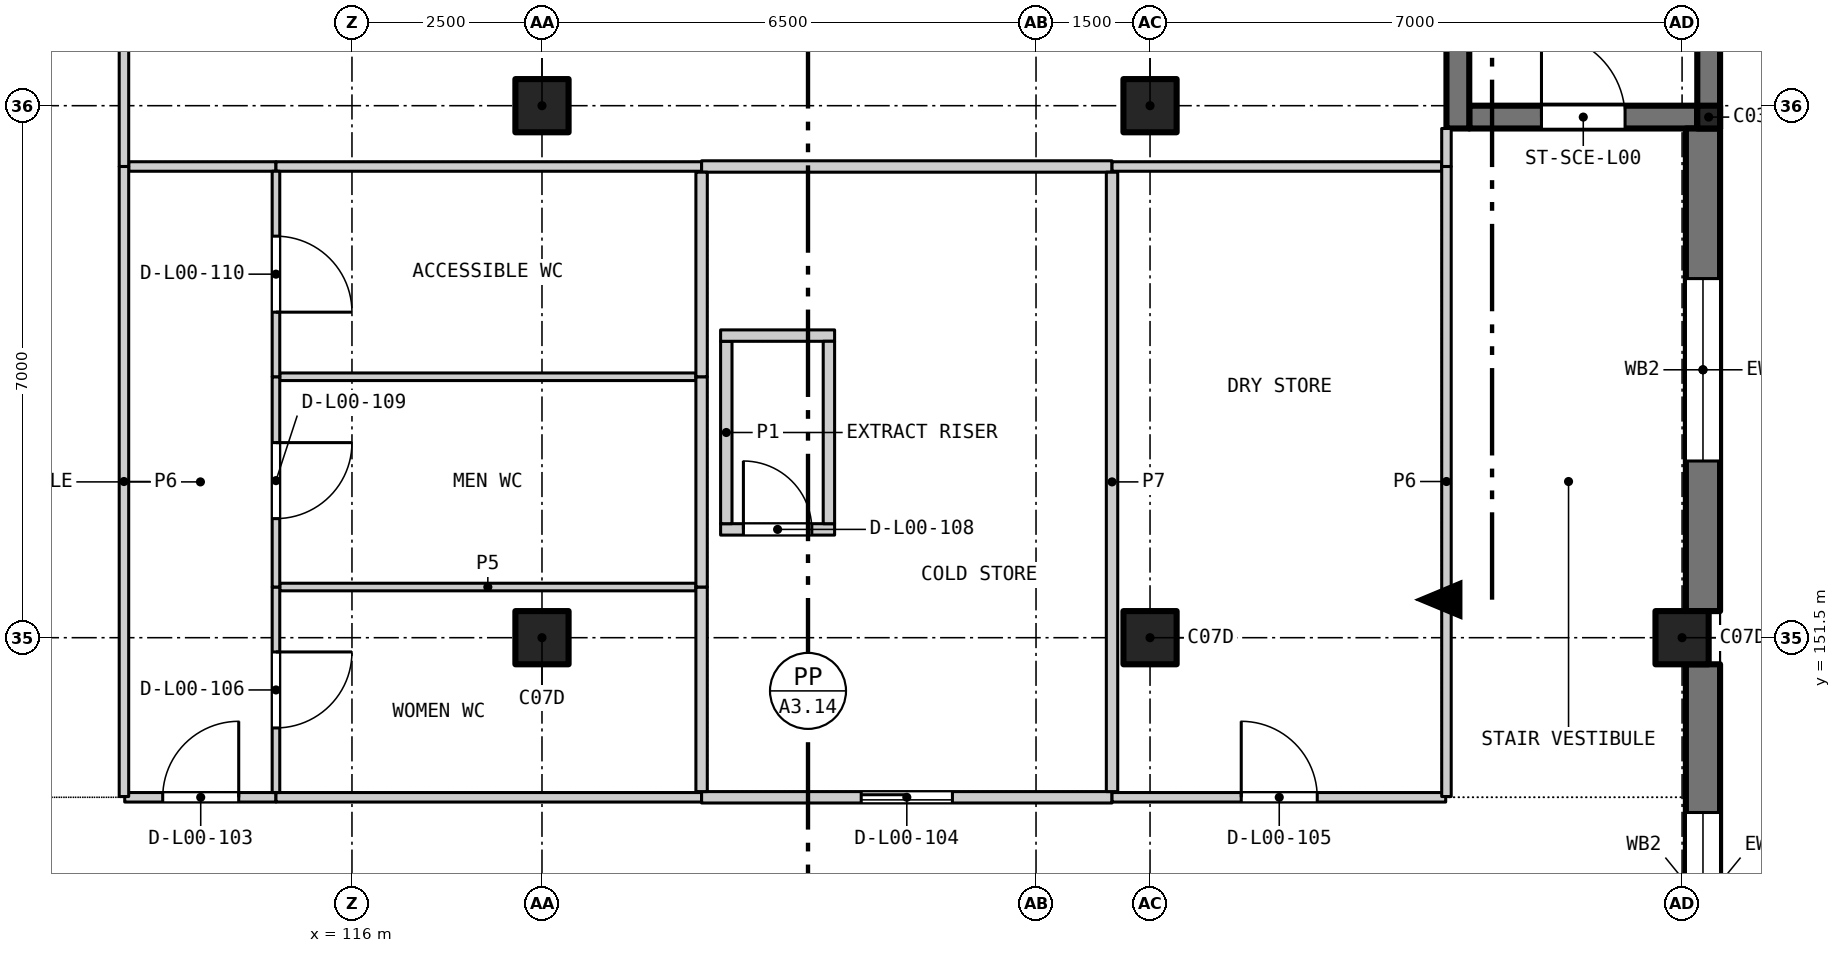
"""IFC4 building model, lengths in metres.
Left out: names, types, materials, properties, quantities, classifications, styles, units other than length and angle.
Written with IfcOpenShell. Run it as: python <this file> out.ifc"""

import sys

from ifc_helpers import new_model, si_unit, direction, frame, frame_2d, origin, origin_2d, place, context, subcontext, project, spatial, rectangle, extrude, element, fill, save


model = new_model("IFC4")
c1 = context("Model", 3, precision=1e-05, world=origin(), true_north=direction((0.0, 1.0)))
c2 = subcontext(c1, "Body", "Model", "MODEL_VIEW")
j1 = project(units=[si_unit("LENGTHUNIT", "METRE"), si_unit("PLANEANGLEUNIT", "RADIAN")], contexts=[c1])
p1 = place(None, origin())
s1 = spatial("IfcSite", under=j1, at=p1, CompositionType="ELEMENT")
p2 = place(p1, origin())
s2 = spatial("IfcBuilding", under=s1, at=p2, CompositionType="ELEMENT")
p3 = place(p2, origin())
s3 = spatial("IfcBuildingStorey", under=s2, at=p3, CompositionType="ELEMENT", Elevation=0.0)
for number, where, z_axis, x_axis in (
    (1, (118.5, 151.5, -1.4), (0.0, 0.0, 1.0), (1.0, 0.0, 0.0)),
    (2, (118.5, 158.5, -1.4), (0.0, 0.0, 1.0), (1.0, 0.0, 0.0)),
    (3, (126.5, 151.5, -1.4), (0.0, 0.0, 1.0), (1.0, 0.0, 0.0)),
    (4, (126.5, 158.5, -1.4), (0.0, 0.0, 1.0), (1.0, 0.0, 0.0)),
    (5, (133.5, 151.5, -1.4), (0.0, 0.0, 1.0), (1.0, 0.0, 0.0)),
):
    element("IfcColumn", number, at=place(p3, frame(where, z_axis=z_axis, x_axis=x_axis)), inside=s3, PredefinedType="COLUMN", context=c2, shape_type="SweptSolid", body=[
        extrude(rectangle(XDim=0.7, YDim=0.7, at=origin_2d()), origin(), (0.0, 0.0, 1.0), 7.4),
    ])
p4 = place(p3, frame((133.85, 158.35, -1.4), z_axis=(0.0, 0.0, 1.0), x_axis=(1.0, 0.0, 0.0)))
e6 = element("IfcColumn", 6, at=p4, inside=s3, PredefinedType="COLUMN", context=c2, shape_type="SweptSolid", body=[
    extrude(rectangle(XDim=0.3, YDim=0.3, at=origin_2d()), origin(), (0.0, 0.0, 1.0), 1.1),
])
p5 = place(p3, frame((130.7, 158.35, -1.4), z_axis=(0.0, 0.0, 1.0), x_axis=(1.0, 0.0, 0.0)))
e7 = element("IfcWall", 7, at=p5, inside=s3, PredefinedType="SHEAR", context=c2, shape_type="SweptSolid", body=[
    extrude(rectangle(XDim=3.0, YDim=0.3, at=frame_2d((1.5, 0.0))), origin(), (0.0, 0.0, 1.0), 7.4),
])
p6 = place(p5, frame((0.95, 0.0, 1.4)))
e8 = element("IfcOpeningElement", 8, at=p6, cuts=e7, PredefinedType="OPENING", context=c2, shape_type="SweptSolid", body=[
    extrude(rectangle(XDim=1.1, YDim=2.1, at=frame_2d((0.55, 1.05))), frame((0.0, 0.16, 0.0), z_axis=(0.0, -1.0, 0.0), x_axis=(1.0, 0.0, 0.0)), (0.0, 0.0, 1.0), 0.32),
])
p7 = place(p3, frame((130.55, 158.2, -1.4), z_axis=(0.0, 0.0, 1.0), x_axis=(0.0, 1.0, 0.0)))
e9 = element("IfcWall", 9, at=p7, inside=s3, PredefinedType="SHEAR", context=c2, shape_type="SweptSolid", body=[
    extrude(rectangle(XDim=7.5, YDim=0.3, at=frame_2d((3.75, 0.0))), origin(), (0.0, 0.0, 1.0), 7.4),
])
p8 = place(p3, frame((133.85, 165.7, 0.0), z_axis=(0.0, 0.0, 1.0), x_axis=(0.0, -1.0, 0.0)))
e10 = element("IfcWall", 10, at=p8, inside=s3, PredefinedType="SOLIDWALL", context=c2, shape_type="SweptSolid", body=[
    extrude(rectangle(XDim=7.5, YDim=0.3, at=frame_2d((3.75, 0.0))), origin(), (0.0, 0.0, 1.0), 5.7),
])
p9 = place(p3, frame((133.775, 151.15, 0.0), z_axis=(0.0, 0.0, 1.0), x_axis=(0.0, -1.0, 0.0)))
e11 = element("IfcWall", 11, at=p9, inside=s3, PredefinedType="SOLIDWALL", context=c2, shape_type="SweptSolid", body=[
    extrude(rectangle(XDim=6.3, YDim=0.45, at=frame_2d((3.15, 0.0))), origin(), (0.0, 0.0, 1.0), 5.0),
])
p10 = place(p9, frame((1.95, 0.0, 0.9)))
e12 = element("IfcOpeningElement", 12, at=p10, cuts=e11, PredefinedType="OPENING", context=c2, shape_type="SweptSolid", body=[
    extrude(rectangle(XDim=2.4, YDim=1.6, at=frame_2d((1.2, 0.8))), frame((0.0, 0.235, 0.0), z_axis=(0.0, -1.0, 0.0), x_axis=(1.0, 0.0, 0.0)), (0.0, 0.0, 1.0), 0.47),
])
p11 = place(p3, frame((133.775, 158.2, 0.0), z_axis=(0.0, 0.0, 1.0), x_axis=(0.0, -1.0, 0.0)))
e13 = element("IfcWall", 13, at=p11, inside=s3, PredefinedType="SOLIDWALL", context=c2, shape_type="SweptSolid", body=[
    extrude(rectangle(XDim=6.35, YDim=0.45, at=frame_2d((3.175, 0.0))), origin(), (0.0, 0.0, 1.0), 5.0),
])
p12 = place(p11, frame((1.975, 0.0, 0.9)))
e14 = element("IfcOpeningElement", 14, at=p12, cuts=e13, PredefinedType="OPENING", context=c2, shape_type="SweptSolid", body=[
    extrude(rectangle(XDim=2.4, YDim=1.6, at=frame_2d((1.2, 0.8))), frame((0.0, 0.235, 0.0), z_axis=(0.0, -1.0, 0.0), x_axis=(1.0, 0.0, 0.0)), (0.0, 0.0, 1.0), 0.47),
])
p13 = place(p3, frame((120.85, 152.925, 0.0), z_axis=(0.0, 0.0, 1.0), x_axis=(1.0, 0.0, 0.0)))
e15 = element("IfcWall", 15, at=p13, inside=s3, PredefinedType="PARTITIONING", context=c2, shape_type="SweptSolid", body=[
    extrude(rectangle(XDim=1.5, YDim=0.15, at=frame_2d((0.75, 0.0))), origin(), (0.0, 0.0, 1.0), 5.7),
])
p14 = place(p13, frame((0.3, 0.0, 0.0)))
e16 = element("IfcOpeningElement", 16, at=p14, cuts=e15, PredefinedType="OPENING", context=c2, shape_type="SweptSolid", body=[
    extrude(rectangle(XDim=0.9, YDim=2.1, at=frame_2d((0.45, 1.05))), frame((0.0, 0.085, 0.0), z_axis=(0.0, -1.0, 0.0), x_axis=(1.0, 0.0, 0.0)), (0.0, 0.0, 1.0), 0.17),
])
p15 = place(p3, frame((120.925, 153.0, 0.0), z_axis=(0.0, 0.0, 1.0), x_axis=(0.0, 1.0, 0.0)))
e17 = element("IfcWall", 17, at=p15, inside=s3, PredefinedType="PARTITIONING", context=c2, shape_type="SweptSolid", body=[
    extrude(rectangle(XDim=2.4, YDim=0.15, at=frame_2d((1.2, 0.0))), origin(), (0.0, 0.0, 1.0), 5.7),
])
p16 = place(p3, frame((120.85, 155.475, 0.0), z_axis=(0.0, 0.0, 1.0), x_axis=(1.0, 0.0, 0.0)))
e18 = element("IfcWall", 18, at=p16, inside=s3, PredefinedType="PARTITIONING", context=c2, shape_type="SweptSolid", body=[
    extrude(rectangle(XDim=1.5, YDim=0.15, at=frame_2d((0.75, 0.0))), origin(), (0.0, 0.0, 1.0), 5.7),
])
p17 = place(p3, frame((122.275, 153.0, 0.0), z_axis=(0.0, 0.0, 1.0), x_axis=(0.0, 1.0, 0.0)))
e19 = element("IfcWall", 19, at=p17, inside=s3, PredefinedType="PARTITIONING", context=c2, shape_type="SweptSolid", body=[
    extrude(rectangle(XDim=2.4, YDim=0.15, at=frame_2d((1.2, 0.0))), origin(), (0.0, 0.0, 1.0), 5.7),
])
p18 = place(p3, frame((113.01, 149.4, 0.0), z_axis=(0.0, 0.0, 1.0), x_axis=(1.0, 0.0, 0.0)))
e20 = element("IfcWall", 20, at=p18, inside=s3, PredefinedType="PARTITIONING", context=c2, shape_type="SweptSolid", body=[
    extrude(rectangle(XDim=1.99, YDim=0.125, at=frame_2d((0.995, 0.0))), origin(), (0.0, 0.0, 1.0), 5.7),
])
p19 = place(p18, frame((0.5, 0.0, 0.0)))
e21 = element("IfcOpeningElement", 21, at=p19, cuts=e20, PredefinedType="OPENING", context=c2, shape_type="SweptSolid", body=[
    extrude(rectangle(XDim=1.0, YDim=2.1, at=frame_2d((0.5, 1.05))), frame((0.0, 0.073, 0.0), z_axis=(0.0, -1.0, 0.0), x_axis=(1.0, 0.0, 0.0)), (0.0, 0.0, 1.0), 0.145),
])
p20 = place(p3, frame((115.0, 149.4, 0.0), z_axis=(0.0, 0.0, 1.0), x_axis=(1.0, 0.0, 0.0)))
e22 = element("IfcWall", 22, at=p20, inside=s3, PredefinedType="PARTITIONING", context=c2, shape_type="SweptSolid", body=[
    extrude(rectangle(XDim=5.6, YDim=0.125, at=frame_2d((2.8, 0.0))), origin(), (0.0, 0.0, 1.0), 5.7),
])
p21 = place(p3, frame((120.6, 149.4, 0.0), z_axis=(0.0, 0.0, 1.0), x_axis=(1.0, 0.0, 0.0)))
e23 = element("IfcWall", 23, at=p21, inside=s3, PredefinedType="PARTITIONING", context=c2, shape_type="SweptSolid", body=[
    extrude(rectangle(XDim=5.4, YDim=0.15, at=frame_2d((2.7, 0.0))), origin(), (0.0, 0.0, 1.0), 5.7),
])
p22 = place(p21, frame((2.1, 0.0, 0.0)))
e24 = element("IfcOpeningElement", 24, at=p22, cuts=e23, PredefinedType="OPENING", context=c2, shape_type="SweptSolid", body=[
    extrude(rectangle(XDim=1.2, YDim=2.4, at=frame_2d((0.6, 1.2))), frame((0.0, 0.085, 0.0), z_axis=(0.0, -1.0, 0.0), x_axis=(1.0, 0.0, 0.0)), (0.0, 0.0, 1.0), 0.17),
])
p23 = place(p3, frame((126.0, 149.4, 0.0), z_axis=(0.0, 0.0, 1.0), x_axis=(1.0, 0.0, 0.0)))
e25 = element("IfcWall", 25, at=p23, inside=s3, PredefinedType="PARTITIONING", context=c2, shape_type="SweptSolid", body=[
    extrude(rectangle(XDim=4.39, YDim=0.125, at=frame_2d((2.195, 0.0))), origin(), (0.0, 0.0, 1.0), 5.7),
])
p24 = place(p23, frame((1.7, 0.0, 0.0)))
e26 = element("IfcOpeningElement", 26, at=p24, cuts=e25, PredefinedType="OPENING", context=c2, shape_type="SweptSolid", body=[
    extrude(rectangle(XDim=1.0, YDim=2.1, at=frame_2d((0.5, 1.05))), frame((0.0, 0.073, 0.0), z_axis=(0.0, -1.0, 0.0), x_axis=(1.0, 0.0, 0.0)), (0.0, 0.0, 1.0), 0.145),
])
for number, where, z_axis, x_axis in (
    (27, (115.05, 152.167, 0.0), (0.0, 0.0, 1.0), (1.0, 0.0, 0.0)),
    (28, (115.05, 154.933, 0.0), (0.0, 0.0, 1.0), (1.0, 0.0, 0.0)),
):
    element("IfcWall", number, at=place(p3, frame(where, z_axis=z_axis, x_axis=x_axis)), inside=s3, PredefinedType="PARTITIONING", context=c2, shape_type="SweptSolid", body=[
        extrude(rectangle(XDim=5.475, YDim=0.1, at=frame_2d((2.737, 0.0))), origin(), (0.0, 0.0, 1.0), 5.7),
    ])
p25 = place(p3, frame((113.062, 157.7, 0.0), z_axis=(0.0, 0.0, 1.0), x_axis=(1.0, 0.0, 0.0)))
e29 = element("IfcWall", 29, at=p25, inside=s3, PredefinedType="PARTITIONING", context=c2, shape_type="SweptSolid", body=[
    extrude(rectangle(XDim=1.938, YDim=0.125, at=frame_2d((0.969, 0.0))), origin(), (0.0, 0.0, 1.0), 5.7),
])
p26 = place(p3, frame((115.0, 157.7, 0.0), z_axis=(0.0, 0.0, 1.0), x_axis=(1.0, 0.0, 0.0)))
e30 = element("IfcWall", 30, at=p26, inside=s3, PredefinedType="PARTITIONING", context=c2, shape_type="SweptSolid", body=[
    extrude(rectangle(XDim=5.6, YDim=0.125, at=frame_2d((2.8, 0.0))), origin(), (0.0, 0.0, 1.0), 5.7),
])
p27 = place(p3, frame((120.6, 157.7, 0.0), z_axis=(0.0, 0.0, 1.0), x_axis=(1.0, 0.0, 0.0)))
e31 = element("IfcWall", 31, at=p27, inside=s3, PredefinedType="PARTITIONING", context=c2, shape_type="SweptSolid", body=[
    extrude(rectangle(XDim=5.4, YDim=0.15, at=frame_2d((2.7, 0.0))), origin(), (0.0, 0.0, 1.0), 5.7),
])
p28 = place(p3, frame((126.0, 157.7, 0.0), z_axis=(0.0, 0.0, 1.0), x_axis=(1.0, 0.0, 0.0)))
e32 = element("IfcWall", 32, at=p28, inside=s3, PredefinedType="PARTITIONING", context=c2, shape_type="SweptSolid", body=[
    extrude(rectangle(XDim=4.337, YDim=0.125, at=frame_2d((2.169, 0.0))), origin(), (0.0, 0.0, 1.0), 5.7),
])
p29 = place(p3, frame((113.0, 149.41, 0.0), z_axis=(0.0, 0.0, 1.0), x_axis=(0.0, 1.0, 0.0)))
e33 = element("IfcWall", 33, at=p29, inside=s3, PredefinedType="PARTITIONING", context=c2, shape_type="SweptSolid", body=[
    extrude(rectangle(XDim=8.29, YDim=0.125, at=frame_2d((4.145, 0.0))), origin(), (0.0, 0.0, 1.0), 5.7),
])
p30 = place(p3, frame((113.0, 157.7, 0.0), z_axis=(0.0, 0.0, 1.0), x_axis=(0.0, 1.0, 0.0)))
e34 = element("IfcWall", 34, at=p30, inside=s3, PredefinedType="PARTITIONING", context=c2, shape_type="SweptSolid", body=[
    extrude(rectangle(XDim=7.85, YDim=0.125, at=frame_2d((3.925, 0.0))), origin(), (0.0, 0.0, 1.0), 5.7),
])
p31 = place(p30, frame((3.05, 0.0, 0.0)))
e35 = element("IfcOpeningElement", 35, at=p31, cuts=e34, PredefinedType="OPENING", context=c2, shape_type="SweptSolid", body=[
    extrude(rectangle(XDim=1.8, YDim=2.1, at=frame_2d((0.9, 1.05))), frame((0.0, 0.073, 0.0), z_axis=(0.0, -1.0, 0.0), x_axis=(1.0, 0.0, 0.0)), (0.0, 0.0, 1.0), 0.145),
])
p32 = place(p3, frame((115.0, 149.462, 0.0), z_axis=(0.0, 0.0, 1.0), x_axis=(0.0, 1.0, 0.0)))
e36 = element("IfcWall", 36, at=p32, inside=s3, PredefinedType="PARTITIONING", context=c2, shape_type="SweptSolid", body=[
    extrude(rectangle(XDim=2.704, YDim=0.1, at=frame_2d((1.352, 0.0))), origin(), (0.0, 0.0, 1.0), 5.7),
])
p33 = place(p32, frame((0.85, 0.0, 0.0)))
e37 = element("IfcOpeningElement", 37, at=p33, cuts=e36, PredefinedType="OPENING", context=c2, shape_type="SweptSolid", body=[
    extrude(rectangle(XDim=1.0, YDim=2.1, at=frame_2d((0.5, 1.05))), frame((0.0, 0.06, 0.0), z_axis=(0.0, -1.0, 0.0), x_axis=(1.0, 0.0, 0.0)), (0.0, 0.0, 1.0), 0.12),
])
p34 = place(p3, frame((115.0, 152.167, 0.0), z_axis=(0.0, 0.0, 1.0), x_axis=(0.0, 1.0, 0.0)))
e38 = element("IfcWall", 38, at=p34, inside=s3, PredefinedType="PARTITIONING", context=c2, shape_type="SweptSolid", body=[
    extrude(rectangle(XDim=2.767, YDim=0.1, at=frame_2d((1.383, 0.0))), origin(), (0.0, 0.0, 1.0), 5.7),
])
p35 = place(p34, frame((0.9, 0.0, 0.0)))
e39 = element("IfcOpeningElement", 39, at=p35, cuts=e38, PredefinedType="OPENING", context=c2, shape_type="SweptSolid", body=[
    extrude(rectangle(XDim=1.0, YDim=2.1, at=frame_2d((0.5, 1.05))), frame((0.0, 0.06, 0.0), z_axis=(0.0, -1.0, 0.0), x_axis=(1.0, 0.0, 0.0)), (0.0, 0.0, 1.0), 0.12),
])
p36 = place(p3, frame((115.0, 154.933, 0.0), z_axis=(0.0, 0.0, 1.0), x_axis=(0.0, 1.0, 0.0)))
e40 = element("IfcWall", 40, at=p36, inside=s3, PredefinedType="PARTITIONING", context=c2, shape_type="SweptSolid", body=[
    extrude(rectangle(XDim=2.704, YDim=0.1, at=frame_2d((1.352, 0.0))), origin(), (0.0, 0.0, 1.0), 5.7),
])
p37 = place(p36, frame((0.85, 0.0, 0.0)))
e41 = element("IfcOpeningElement", 41, at=p37, cuts=e40, PredefinedType="OPENING", context=c2, shape_type="SweptSolid", body=[
    extrude(rectangle(XDim=1.0, YDim=2.1, at=frame_2d((0.5, 1.05))), frame((0.0, 0.06, 0.0), z_axis=(0.0, -1.0, 0.0), x_axis=(1.0, 0.0, 0.0)), (0.0, 0.0, 1.0), 0.12),
])
p38 = place(p3, frame((120.6, 149.475, 0.0), z_axis=(0.0, 0.0, 1.0), x_axis=(0.0, 1.0, 0.0)))
e42 = element("IfcWall", 42, at=p38, inside=s3, PredefinedType="PARTITIONING", context=c2, shape_type="SweptSolid", body=[
    extrude(rectangle(XDim=2.692, YDim=0.15, at=frame_2d((1.346, 0.0))), origin(), (0.0, 0.0, 1.0), 5.7),
])
p39 = place(p3, frame((120.6, 152.167, 0.0), z_axis=(0.0, 0.0, 1.0), x_axis=(0.0, 1.0, 0.0)))
e43 = element("IfcWall", 43, at=p39, inside=s3, PredefinedType="PARTITIONING", context=c2, shape_type="SweptSolid", body=[
    extrude(rectangle(XDim=2.767, YDim=0.15, at=frame_2d((1.383, 0.0))), origin(), (0.0, 0.0, 1.0), 5.7),
])
p40 = place(p3, frame((120.6, 154.933, 0.0), z_axis=(0.0, 0.0, 1.0), x_axis=(0.0, 1.0, 0.0)))
e44 = element("IfcWall", 44, at=p40, inside=s3, PredefinedType="PARTITIONING", context=c2, shape_type="SweptSolid", body=[
    extrude(rectangle(XDim=2.692, YDim=0.15, at=frame_2d((1.346, 0.0))), origin(), (0.0, 0.0, 1.0), 5.7),
])
p41 = place(p3, frame((126.0, 149.475, 0.0), z_axis=(0.0, 0.0, 1.0), x_axis=(0.0, 1.0, 0.0)))
e45 = element("IfcWall", 45, at=p41, inside=s3, PredefinedType="PARTITIONING", context=c2, shape_type="SweptSolid", body=[
    extrude(rectangle(XDim=8.15, YDim=0.15, at=frame_2d((4.075, 0.0))), origin(), (0.0, 0.0, 1.0), 5.7),
])
p42 = place(p3, frame((130.4, 149.41, 0.0), z_axis=(0.0, 0.0, 1.0), x_axis=(0.0, 1.0, 0.0)))
e46 = element("IfcWall", 46, at=p42, inside=s3, PredefinedType="PARTITIONING", context=c2, shape_type="SweptSolid", body=[
    extrude(rectangle(XDim=8.29, YDim=0.125, at=frame_2d((4.145, 0.0))), origin(), (0.0, 0.0, 1.0), 5.7),
])
p43 = place(p3, frame((130.4, 157.7, 0.0), z_axis=(0.0, 0.0, 1.0), x_axis=(0.0, 1.0, 0.0)))
e47 = element("IfcWall", 47, at=p43, inside=s3, PredefinedType="PARTITIONING", context=c2, shape_type="SweptSolid", body=[
    extrude(rectangle(XDim=0.5, YDim=0.125, at=frame_2d((0.25, 0.0))), origin(), (0.0, 0.0, 1.0), 5.7),
])
p44 = place(p10, origin())
e48 = element("IfcWindow", 48, at=p44, inside=s3, PartitioningType="SINGLE_PANEL", PredefinedType="WINDOW", context=c2, shape_type="SweptSolid", body=[
    extrude(rectangle(XDim=2.4, YDim=1.6, at=frame_2d((1.2, 0.8))), frame((0.0, -0.125, 0.0), z_axis=(0.0, -1.0, 0.0), x_axis=(1.0, 0.0, 0.0)), (0.0, 0.0, 1.0), 0.06),
])
fill(e12, e48)
p45 = place(p12, origin())
e49 = element("IfcWindow", 49, at=p45, inside=s3, PartitioningType="SINGLE_PANEL", PredefinedType="WINDOW", context=c2, shape_type="SweptSolid", body=[
    extrude(rectangle(XDim=2.4, YDim=1.6, at=frame_2d((1.2, 0.8))), frame((0.0, -0.125, 0.0), z_axis=(0.0, -1.0, 0.0), x_axis=(1.0, 0.0, 0.0)), (0.0, 0.0, 1.0), 0.06),
])
fill(e14, e49)
p46 = place(p19, origin())
e50 = element("IfcDoor", 50, at=p46, inside=s3, OperationType="SINGLE_SWING_RIGHT", PredefinedType="DOOR", context=c2, shape_type="SweptSolid", body=[
    extrude(rectangle(XDim=1.0, YDim=2.1, at=frame_2d((0.5, 1.05))), frame((0.0, 0.025, 0.0), z_axis=(0.0, -1.0, 0.0), x_axis=(1.0, 0.0, 0.0)), (0.0, 0.0, 1.0), 0.05),
])
fill(e21, e50)
p47 = place(p22, origin())
e51 = element("IfcDoor", 51, at=p47, inside=s3, OperationType="SLIDING_TO_LEFT", PredefinedType="DOOR", context=c2, shape_type="SweptSolid", body=[
    extrude(rectangle(XDim=1.2, YDim=2.4, at=frame_2d((0.6, 1.2))), frame((0.0, 0.025, 0.0), z_axis=(0.0, -1.0, 0.0), x_axis=(1.0, 0.0, 0.0)), (0.0, 0.0, 1.0), 0.05),
])
fill(e24, e51)
p48 = place(p24, origin())
e52 = element("IfcDoor", 52, at=p48, inside=s3, OperationType="SINGLE_SWING_LEFT", PredefinedType="DOOR", context=c2, shape_type="SweptSolid", body=[
    extrude(rectangle(XDim=1.0, YDim=2.1, at=frame_2d((0.5, 1.05))), frame((0.0, 0.025, 0.0), z_axis=(0.0, -1.0, 0.0), x_axis=(1.0, 0.0, 0.0)), (0.0, 0.0, 1.0), 0.05),
])
fill(e26, e52)
p49 = place(p33, frame((1.0, 0.0, 0.0), z_axis=(0.0, 0.0, 1.0), x_axis=(-1.0, 0.0, 0.0)))
e53 = element("IfcDoor", 53, at=p49, inside=s3, OperationType="SINGLE_SWING_LEFT", PredefinedType="DOOR", context=c2, shape_type="SweptSolid", body=[
    extrude(rectangle(XDim=1.0, YDim=2.1, at=frame_2d((0.5, 1.05))), frame((0.0, 0.025, 0.0), z_axis=(0.0, -1.0, 0.0), x_axis=(1.0, 0.0, 0.0)), (0.0, 0.0, 1.0), 0.05),
])
fill(e37, e53)
p50 = place(p14, origin())
e54 = element("IfcDoor", 54, at=p50, inside=s3, OperationType="SINGLE_SWING_LEFT", PredefinedType="DOOR", context=c2, shape_type="SweptSolid", body=[
    extrude(rectangle(XDim=0.9, YDim=2.1, at=frame_2d((0.45, 1.05))), frame((0.0, 0.025, 0.0), z_axis=(0.0, -1.0, 0.0), x_axis=(1.0, 0.0, 0.0)), (0.0, 0.0, 1.0), 0.05),
])
fill(e16, e54)
p51 = place(p35, frame((1.0, 0.0, 0.0), z_axis=(0.0, 0.0, 1.0), x_axis=(-1.0, 0.0, 0.0)))
e55 = element("IfcDoor", 55, at=p51, inside=s3, OperationType="SINGLE_SWING_LEFT", PredefinedType="DOOR", context=c2, shape_type="SweptSolid", body=[
    extrude(rectangle(XDim=1.0, YDim=2.1, at=frame_2d((0.5, 1.05))), frame((0.0, 0.025, 0.0), z_axis=(0.0, -1.0, 0.0), x_axis=(1.0, 0.0, 0.0)), (0.0, 0.0, 1.0), 0.05),
])
fill(e39, e55)
p52 = place(p37, frame((1.0, 0.0, 0.0), z_axis=(0.0, 0.0, 1.0), x_axis=(-1.0, 0.0, 0.0)))
e56 = element("IfcDoor", 56, at=p52, inside=s3, OperationType="SINGLE_SWING_RIGHT", PredefinedType="DOOR", context=c2, shape_type="SweptSolid", body=[
    extrude(rectangle(XDim=1.0, YDim=2.1, at=frame_2d((0.5, 1.05))), frame((0.0, 0.025, 0.0), z_axis=(0.0, -1.0, 0.0), x_axis=(1.0, 0.0, 0.0)), (0.0, 0.0, 1.0), 0.05),
])
fill(e41, e56)
p53 = place(p6, origin())
e57 = element("IfcDoor", 57, at=p53, inside=s3, OperationType="SINGLE_SWING_LEFT", PredefinedType="DOOR", context=c2, shape_type="SweptSolid", body=[
    extrude(rectangle(XDim=1.1, YDim=2.1, at=frame_2d((0.55, 1.05))), frame((0.0, 0.025, 0.0), z_axis=(0.0, -1.0, 0.0), x_axis=(1.0, 0.0, 0.0)), (0.0, 0.0, 1.0), 0.05),
])
fill(e8, e57)
save(model, sys.argv[1])
